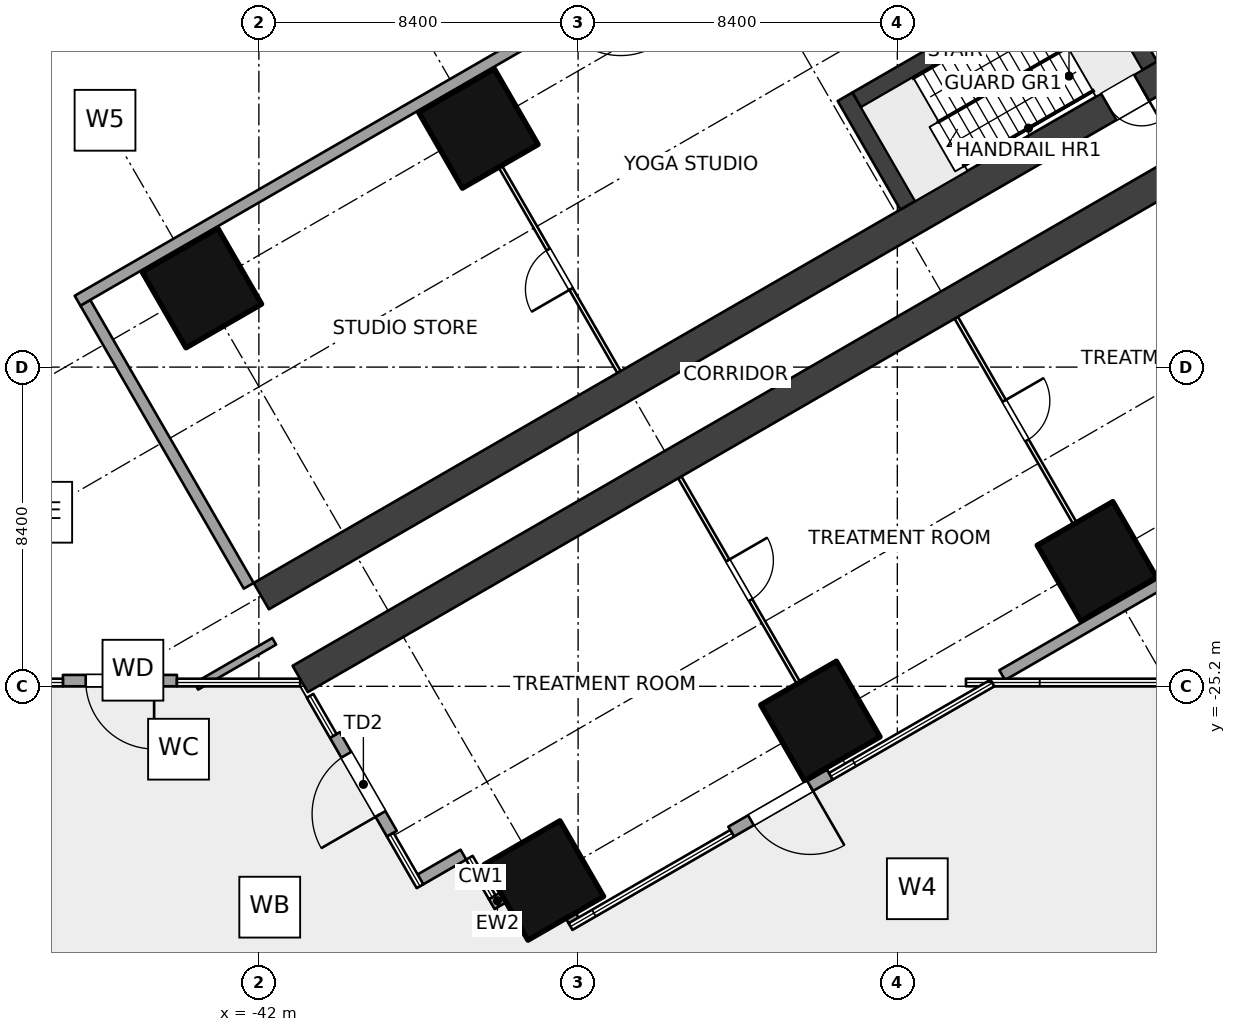
"""IFC4 building model, lengths in metres.
Left out: names, types, materials, properties, quantities, classifications, styles, units other than length and angle.
Written with IfcOpenShell. Run it as: python <this file> out.ifc"""

import sys

from ifc_helpers import new_model, si_unit, direction, frame, frame_2d, origin, origin_2d, place, context, subcontext, project, spatial, rectangle, extrude, element, fill, save


model = new_model("IFC4")
c1 = context("Model", 3, precision=1e-05, world=origin(), true_north=direction((0.0, 1.0)))
c2 = subcontext(c1, "Body", "Model", "MODEL_VIEW")
j1 = project(units=[si_unit("LENGTHUNIT", "METRE"), si_unit("PLANEANGLEUNIT", "RADIAN")], contexts=[c1])
p1 = place(None, origin())
s1 = spatial("IfcSite", under=j1, at=p1, CompositionType="ELEMENT")
p2 = place(p1, origin())
s2 = spatial("IfcBuilding", under=s1, at=p2, CompositionType="ELEMENT")
p3 = place(p2, frame((0.0, 0.0, 11.0)))
s3 = spatial("IfcBuildingStorey", under=s2, at=p3, CompositionType="ELEMENT", Elevation=11.0)
for number, where, z_axis, x_axis in (
    (1, (-19.949, -21.91, 0.0), (0.0, 0.0, 1.0), (-0.5, 0.866, 0.0)),
    (2, (-27.224, -26.11, 0.0), (0.0, 0.0, 1.0), (-0.5, 0.866, 0.0)),
    (3, (-36.224, -10.521, 0.0), (0.0, 0.0, 1.0), (-0.5, 0.866, 0.0)),
    (4, (-34.499, -30.31, 0.0), (0.0, 0.0, 1.0), (-0.5, 0.866, 0.0)),
    (5, (-43.499, -14.721, 0.0), (0.0, 0.0, 1.0), (-0.5, 0.866, 0.0)),
):
    element("IfcColumn", number, at=place(p3, frame(where, z_axis=z_axis, x_axis=x_axis)), inside=s3, PredefinedType="COLUMN", context=c2, shape_type="SweptSolid", body=[
        extrude(rectangle(XDim=2.3, YDim=2.3, at=origin_2d()), origin(), (0.0, 0.0, 1.0), 5.0),
    ])
p4 = place(p3, frame((-8.91, -6.53, 0.0), z_axis=(0.0, 0.0, 1.0), x_axis=(-0.866024404313, -0.500001731131, 0.0)))
e6 = element("IfcWall", 6, at=p4, inside=s3, PredefinedType="SHEAR", context=c2, shape_type="SweptSolid", body=[
    extrude(rectangle(XDim=36.953, YDim=0.8, at=frame_2d((18.477, 0.0))), origin(), (0.0, 0.0, 1.0), 5.0),
])
p5 = place(p4, frame((2.75, 0.0, 0.0)))
e7 = element("IfcOpeningElement", 7, at=p5, cuts=e6, PredefinedType="OPENING", context=c2, shape_type="SweptSolid", body=[
    extrude(rectangle(XDim=1.2, YDim=2.1, at=frame_2d((0.6, 1.05))), frame((0.0, 0.41, 0.0), z_axis=(0.0, -1.0, 0.0), x_axis=(1.0, 0.0, 0.0)), (0.0, 0.0, 1.0), 0.82),
])
p6 = place(p4, frame((7.35, 0.0, 0.0)))
e8 = element("IfcOpeningElement", 8, at=p6, cuts=e6, PredefinedType="OPENING", context=c2, shape_type="SweptSolid", body=[
    extrude(rectangle(XDim=1.2, YDim=2.1, at=frame_2d((0.6, 1.05))), frame((0.0, 0.41, 0.0), z_axis=(0.0, -1.0, 0.0), x_axis=(1.0, 0.0, 0.0)), (0.0, 0.0, 1.0), 0.82),
])
p7 = place(p3, frame((-10.11, -4.451, 0.0), z_axis=(0.0, 0.0, 1.0), x_axis=(-0.866025284237, -0.500000207062, 0.0)))
e9 = element("IfcWall", 9, at=p7, inside=s3, PredefinedType="SHEAR", context=c2, shape_type="SweptSolid", body=[
    extrude(rectangle(XDim=36.75, YDim=0.8, at=frame_2d((18.375, 0.0))), origin(), (0.0, 0.0, 1.0), 5.0),
])
p8 = place(p7, frame((10.0, 0.0, 0.0)))
e10 = element("IfcOpeningElement", 10, at=p8, cuts=e9, PredefinedType="OPENING", context=c2, shape_type="SweptSolid", body=[
    extrude(rectangle(XDim=1.0, YDim=2.1, at=frame_2d((0.5, 1.05))), frame((0.0, 0.41, 0.0), z_axis=(0.0, -1.0, 0.0), x_axis=(1.0, 0.0, 0.0)), (0.0, 0.0, 1.0), 0.82),
])
p9 = place(p7, frame((2.85, 0.0, 0.0)))
e11 = element("IfcOpeningElement", 11, at=p9, cuts=e9, PredefinedType="OPENING", context=c2, shape_type="SweptSolid", body=[
    extrude(rectangle(XDim=1.2, YDim=2.1, at=frame_2d((0.6, 1.05))), frame((0.0, 0.41, 0.0), z_axis=(0.0, -1.0, 0.0), x_axis=(1.0, 0.0, 0.0)), (0.0, 0.0, 1.0), 0.82),
])
p10 = place(p3, frame((-35.572, -30.757, 0.0), z_axis=(0.0, 0.0, 1.0), x_axis=(-0.865939549016, -0.500148675346, 0.0)))
e12 = element("IfcWall", 12, at=p10, inside=s3, PredefinedType="SOLIDWALL", context=c2, shape_type="SweptSolid", body=[
    extrude(rectangle(XDim=0.347, YDim=0.3, at=frame_2d((0.174, 0.0))), origin(), (0.0, 0.0, 1.0), 4.7),
])
p11 = place(p3, frame((-36.618, -29.629, 0.0), z_axis=(0.0, 0.0, 1.0), x_axis=(-0.866101796549, -0.4998676605, 0.0)))
e13 = element("IfcWall", 13, at=p11, inside=s3, PredefinedType="SOLIDWALL", context=c2, shape_type="SweptSolid", body=[
    extrude(rectangle(XDim=1.31, YDim=0.3, at=frame_2d((0.655, 0.0))), origin(), (0.0, 0.0, 1.0), 4.7),
])
p12 = place(p3, frame((-38.5, -29.08, 0.0), z_axis=(0.0, 0.0, 1.0), x_axis=(-0.499990139034, 0.866031096941, 0.0)))
e14 = element("IfcWall", 14, at=p12, inside=s3, PredefinedType="SOLIDWALL", context=c2, shape_type="SweptSolid", body=[
    extrude(rectangle(XDim=3.0, YDim=0.3, at=frame_2d((1.5, 0.0))), origin(), (0.0, 0.0, 1.0), 3.1),
])
p13 = place(p12, frame((0.6, 0.0, 0.0)))
e15 = element("IfcOpeningElement", 15, at=p13, cuts=e14, PredefinedType="OPENING", context=c2, shape_type="SweptSolid", body=[
    extrude(rectangle(XDim=1.8, YDim=2.4, at=frame_2d((0.9, 1.2))), frame((0.0, 0.16, 0.0), z_axis=(0.0, -1.0, 0.0), x_axis=(1.0, 0.0, 0.0)), (0.0, 0.0, 1.0), 0.32),
])
p14 = place(p3, frame((-44.156, -25.05, 0.0), z_axis=(0.0, 0.0, 1.0), x_axis=(-1.0, 0.0, 0.0)))
e16 = element("IfcWall", 16, at=p14, inside=s3, PredefinedType="SOLIDWALL", context=c2, shape_type="SweptSolid", body=[
    extrude(rectangle(XDim=3.0, YDim=0.3, at=frame_2d((1.5, 0.0))), origin(), (0.0, 0.0, 1.0), 4.7),
])
p15 = place(p14, frame((0.6, 0.0, 0.0)))
e17 = element("IfcOpeningElement", 17, at=p15, cuts=e16, PredefinedType="OPENING", context=c2, shape_type="SweptSolid", body=[
    extrude(rectangle(XDim=1.8, YDim=2.4, at=frame_2d((0.9, 1.2))), frame((0.0, 0.16, 0.0), z_axis=(0.0, -1.0, 0.0), x_axis=(1.0, 0.0, 0.0)), (0.0, 0.0, 1.0), 0.32),
])
p16 = place(p3, frame((-26.974, -27.525, 0.0), z_axis=(0.0, 0.0, 1.0), x_axis=(-0.866010750942, -0.50002537861, 0.0)))
e18 = element("IfcWall", 18, at=p16, inside=s3, PredefinedType="SOLIDWALL", context=c2, shape_type="SweptSolid", body=[
    extrude(rectangle(XDim=3.0, YDim=0.3, at=frame_2d((1.5, 0.0))), origin(), (0.0, 0.0, 1.0), 4.7),
])
p17 = place(p16, frame((0.6, 0.0, 0.0)))
e19 = element("IfcOpeningElement", 19, at=p17, cuts=e18, PredefinedType="OPENING", context=c2, shape_type="SweptSolid", body=[
    extrude(rectangle(XDim=1.8, YDim=2.4, at=frame_2d((0.9, 1.2))), frame((0.0, 0.16, 0.0), z_axis=(0.0, -1.0, 0.0), x_axis=(1.0, 0.0, 0.0)), (0.0, 0.0, 1.0), 0.32),
])
p18 = place(p3, frame((-33.716, -31.365, 0.0), z_axis=(0.0, 0.0, 1.0), x_axis=(-0.499953773667, 0.866052090925, 0.0)))
e20 = element("IfcWall", 20, at=p18, inside=s3, PredefinedType="SOLIDWALL", context=c2, shape_type="SweptSolid", body=[
    extrude(rectangle(XDim=1.005, YDim=0.3, at=frame_2d((0.502, 0.0))), origin(), (0.0, 0.0, 1.0), 4.7),
])
p19 = place(p3, frame((-23.649, -15.501, 0.0), z_axis=(0.0, 0.0, 1.0), x_axis=(0.500004234368, -0.866022959057, 0.0)))
e21 = element("IfcWall", 21, at=p19, inside=s3, PredefinedType="PARTITIONING", context=c2, shape_type="SweptSolid", body=[
    extrude(rectangle(XDim=6.25, YDim=0.1, at=frame_2d((3.125, 0.0))), origin(), (0.0, 0.0, 1.0), 2.9),
])
p20 = place(p19, frame((2.525, 0.0, 0.0)))
e22 = element("IfcOpeningElement", 22, at=p20, cuts=e21, PredefinedType="OPENING", context=c2, shape_type="SweptSolid", body=[
    extrude(rectangle(XDim=1.2, YDim=2.1, at=frame_2d((0.6, 1.05))), frame((0.0, 0.06, 0.0), z_axis=(0.0, -1.0, 0.0), x_axis=(1.0, 0.0, 0.0)), (0.0, 0.0, 1.0), 0.12),
])
p21 = place(p3, frame((-30.924, -19.701, 0.0), z_axis=(0.0, 0.0, 1.0), x_axis=(0.500004234368, -0.866022959057, 0.0)))
e23 = element("IfcWall", 23, at=p21, inside=s3, PredefinedType="PARTITIONING", context=c2, shape_type="SweptSolid", body=[
    extrude(rectangle(XDim=6.25, YDim=0.1, at=frame_2d((3.125, 0.0))), origin(), (0.0, 0.0, 1.0), 2.9),
])
p22 = place(p21, frame((2.525, 0.0, 0.0)))
e24 = element("IfcOpeningElement", 24, at=p22, cuts=e23, PredefinedType="OPENING", context=c2, shape_type="SweptSolid", body=[
    extrude(rectangle(XDim=1.2, YDim=2.1, at=frame_2d((0.6, 1.05))), frame((0.0, 0.06, 0.0), z_axis=(0.0, -1.0, 0.0), x_axis=(1.0, 0.0, 0.0)), (0.0, 0.0, 1.0), 0.12),
])
p23 = place(p3, frame((-32.524, -16.93, 0.0), z_axis=(0.0, 0.0, 1.0), x_axis=(-0.500004234368, 0.866022959057, 0.0)))
e25 = element("IfcWall", 25, at=p23, inside=s3, PredefinedType="PARTITIONING", context=c2, shape_type="SweptSolid", body=[
    extrude(rectangle(XDim=6.25, YDim=0.1, at=frame_2d((3.125, 0.0))), origin(), (0.0, 0.0, 1.0), 2.9),
])
p24 = place(p23, frame((2.525, 0.0, 0.0)))
e26 = element("IfcOpeningElement", 26, at=p24, cuts=e25, PredefinedType="OPENING", context=c2, shape_type="SweptSolid", body=[
    extrude(rectangle(XDim=1.2, YDim=2.1, at=frame_2d((0.6, 1.05))), frame((0.0, 0.06, 0.0), z_axis=(0.0, -1.0, 0.0), x_axis=(1.0, 0.0, 0.0)), (0.0, 0.0, 1.0), 0.12),
])
p25 = place(p3, frame((-41.596, -24.016, 0.0), z_axis=(0.0, 0.0, 1.0), x_axis=(-0.866065436262, -0.499930655304, 0.0)))
e27 = element("IfcWall", 27, at=p25, inside=s3, PredefinedType="SOLIDWALL", context=c2, shape_type="SweptSolid", body=[
    extrude(rectangle(XDim=2.368, YDim=0.2, at=frame_2d((1.184, 0.0))), origin(), (0.0, 0.0, 1.0), 4.7),
])
p26 = place(p3, frame((-42.267, -22.555, 0.0), z_axis=(0.0, 0.0, 1.0), x_axis=(-0.500007509209, 0.866021068297, 0.0)))
e28 = element("IfcWall", 28, at=p26, inside=s3, PredefinedType="SOLIDWALL", context=c2, shape_type="SweptSolid", body=[
    extrude(rectangle(XDim=8.6, YDim=0.3, at=frame_2d((4.3, 0.0))), origin(), (0.0, 0.0, 1.0), 3.1),
])
p27 = place(p3, frame((-0.15, -12.038, 0.0), z_axis=(0.0, 0.0, 1.0), x_axis=(-0.866030473254, -0.499991219318, 0.0)))
e29 = element("IfcWall", 29, at=p27, inside=s3, PredefinedType="SOLIDWALL", context=c2, shape_type="SweptSolid", body=[
    extrude(rectangle(XDim=25.739, YDim=0.3, at=frame_2d((12.869, 0.0))), origin(), (0.0, 0.0, 1.0), 4.7),
])
p28 = place(p27, frame((16.983, 0.0, 0.0)))
e30 = element("IfcOpeningElement", 30, at=p28, cuts=e29, PredefinedType="OPENING", context=c2, shape_type="SweptSolid", body=[
    extrude(rectangle(XDim=1.8, YDim=2.4, at=frame_2d((0.9, 1.2))), frame((0.0, 0.16, 0.0), z_axis=(0.0, -1.0, 0.0), x_axis=(1.0, 0.0, 0.0)), (0.0, 0.0, 1.0), 0.32),
])
p29 = place(p3, frame((-9.45, 6.495, 0.0), z_axis=(0.0, 0.0, 1.0), x_axis=(-0.866025301493, -0.500000177174, 0.0)))
e31 = element("IfcWall", 31, at=p29, inside=s3, PredefinedType="SOLIDWALL", context=c2, shape_type="SweptSolid", body=[
    extrude(rectangle(XDim=43.095, YDim=0.3, at=frame_2d((21.548, 0.0))), origin(), (0.0, 0.0, 1.0), 4.7),
])
p30 = place(p29, frame((26.595, 0.0, 0.0)))
e32 = element("IfcOpeningElement", 32, at=p30, cuts=e31, PredefinedType="OPENING", context=c2, shape_type="SweptSolid", body=[
    extrude(rectangle(XDim=1.8, YDim=2.4, at=frame_2d((0.9, 1.2))), frame((0.0, 0.16, 0.0), z_axis=(0.0, -1.0, 0.0), x_axis=(1.0, 0.0, 0.0)), (0.0, 0.0, 1.0), 0.32),
])
for number, where, z_axis, x_axis in (
    (33, (-18.559, -8.868, 0.0), (0.0, 0.0, 1.0), (-0.5, 0.866, 0.0)),
    (34, (-24.925, -12.543, 0.0), (0.0, 0.0, 1.0), (-0.5, 0.866, 0.0)),
):
    element("IfcWall", number, at=place(p3, frame(where, z_axis=z_axis, x_axis=x_axis)), inside=s3, PredefinedType="SOLIDWALL", context=c2, shape_type="SweptSolid", body=[
        extrude(rectangle(XDim=3.3, YDim=0.45, at=frame_2d((1.65, 0.0))), origin(), (0.0, 0.0, 1.0), 5.0),
    ])
p31 = place(p3, frame((-20.292, -6.317, 0.0), z_axis=(0.0, 0.0, 1.0), x_axis=(-0.866028853923, -0.499994024137, 0.0)))
e35 = element("IfcWall", 35, at=p31, inside=s3, PredefinedType="SOLIDWALL", context=c2, shape_type="SweptSolid", body=[
    extrude(rectangle(XDim=6.9, YDim=0.45, at=frame_2d((3.45, 0.0))), origin(), (0.0, 0.0, 1.0), 5.0),
])
p32 = place(p13, origin())
e36 = element("IfcDoor", 36, at=p32, inside=s3, OperationType="DOUBLE_DOOR_SINGLE_SWING", PredefinedType="DOOR", context=c2, shape_type="SweptSolid", body=[
    extrude(rectangle(XDim=1.8, YDim=2.4, at=frame_2d((0.9, 1.2))), frame((0.0, 0.025, 0.0), z_axis=(0.0, -1.0, 0.0), x_axis=(1.0, 0.0, 0.0)), (0.0, 0.0, 1.0), 0.05),
])
fill(e15, e36)
p33 = place(p15, origin())
e37 = element("IfcDoor", 37, at=p33, inside=s3, OperationType="DOUBLE_DOOR_SINGLE_SWING", PredefinedType="DOOR", context=c2, shape_type="SweptSolid", body=[
    extrude(rectangle(XDim=1.8, YDim=2.4, at=frame_2d((0.9, 1.2))), frame((0.0, 0.025, 0.0), z_axis=(0.0, -1.0, 0.0), x_axis=(1.0, 0.0, 0.0)), (0.0, 0.0, 1.0), 0.05),
])
fill(e17, e37)
p34 = place(p17, origin())
e38 = element("IfcDoor", 38, at=p34, inside=s3, OperationType="DOUBLE_DOOR_SINGLE_SWING", PredefinedType="DOOR", context=c2, shape_type="SweptSolid", body=[
    extrude(rectangle(XDim=1.8, YDim=2.4, at=frame_2d((0.9, 1.2))), frame((0.0, 0.025, 0.0), z_axis=(0.0, -1.0, 0.0), x_axis=(1.0, 0.0, 0.0)), (0.0, 0.0, 1.0), 0.05),
])
fill(e19, e38)
p35 = place(p8, origin())
e39 = element("IfcDoor", 39, at=p35, inside=s3, OperationType="SINGLE_SWING_LEFT", PredefinedType="DOOR", context=c2, shape_type="SweptSolid", body=[
    extrude(rectangle(XDim=1.0, YDim=2.1, at=frame_2d((0.5, 1.05))), frame((0.0, 0.025, 0.0), z_axis=(0.0, -1.0, 0.0), x_axis=(1.0, 0.0, 0.0)), (0.0, 0.0, 1.0), 0.05),
])
fill(e10, e39)
p36 = place(p20, origin())
e40 = element("IfcDoor", 40, at=p36, inside=s3, OperationType="DOUBLE_SWING_LEFT", PredefinedType="DOOR", context=c2, shape_type="SweptSolid", body=[
    extrude(rectangle(XDim=1.2, YDim=2.1, at=frame_2d((0.6, 1.05))), frame((0.0, 0.025, 0.0), z_axis=(0.0, -1.0, 0.0), x_axis=(1.0, 0.0, 0.0)), (0.0, 0.0, 1.0), 0.05),
])
fill(e22, e40)
p37 = place(p22, origin())
e41 = element("IfcDoor", 41, at=p37, inside=s3, OperationType="DOUBLE_SWING_LEFT", PredefinedType="DOOR", context=c2, shape_type="SweptSolid", body=[
    extrude(rectangle(XDim=1.2, YDim=2.1, at=frame_2d((0.6, 1.05))), frame((0.0, 0.025, 0.0), z_axis=(0.0, -1.0, 0.0), x_axis=(1.0, 0.0, 0.0)), (0.0, 0.0, 1.0), 0.05),
])
fill(e24, e41)
p38 = place(p24, origin())
e42 = element("IfcDoor", 42, at=p38, inside=s3, OperationType="DOUBLE_SWING_LEFT", PredefinedType="DOOR", context=c2, shape_type="SweptSolid", body=[
    extrude(rectangle(XDim=1.2, YDim=2.1, at=frame_2d((0.6, 1.05))), frame((0.0, 0.025, 0.0), z_axis=(0.0, -1.0, 0.0), x_axis=(1.0, 0.0, 0.0)), (0.0, 0.0, 1.0), 0.05),
])
fill(e26, e42)
save(model, sys.argv[1])
